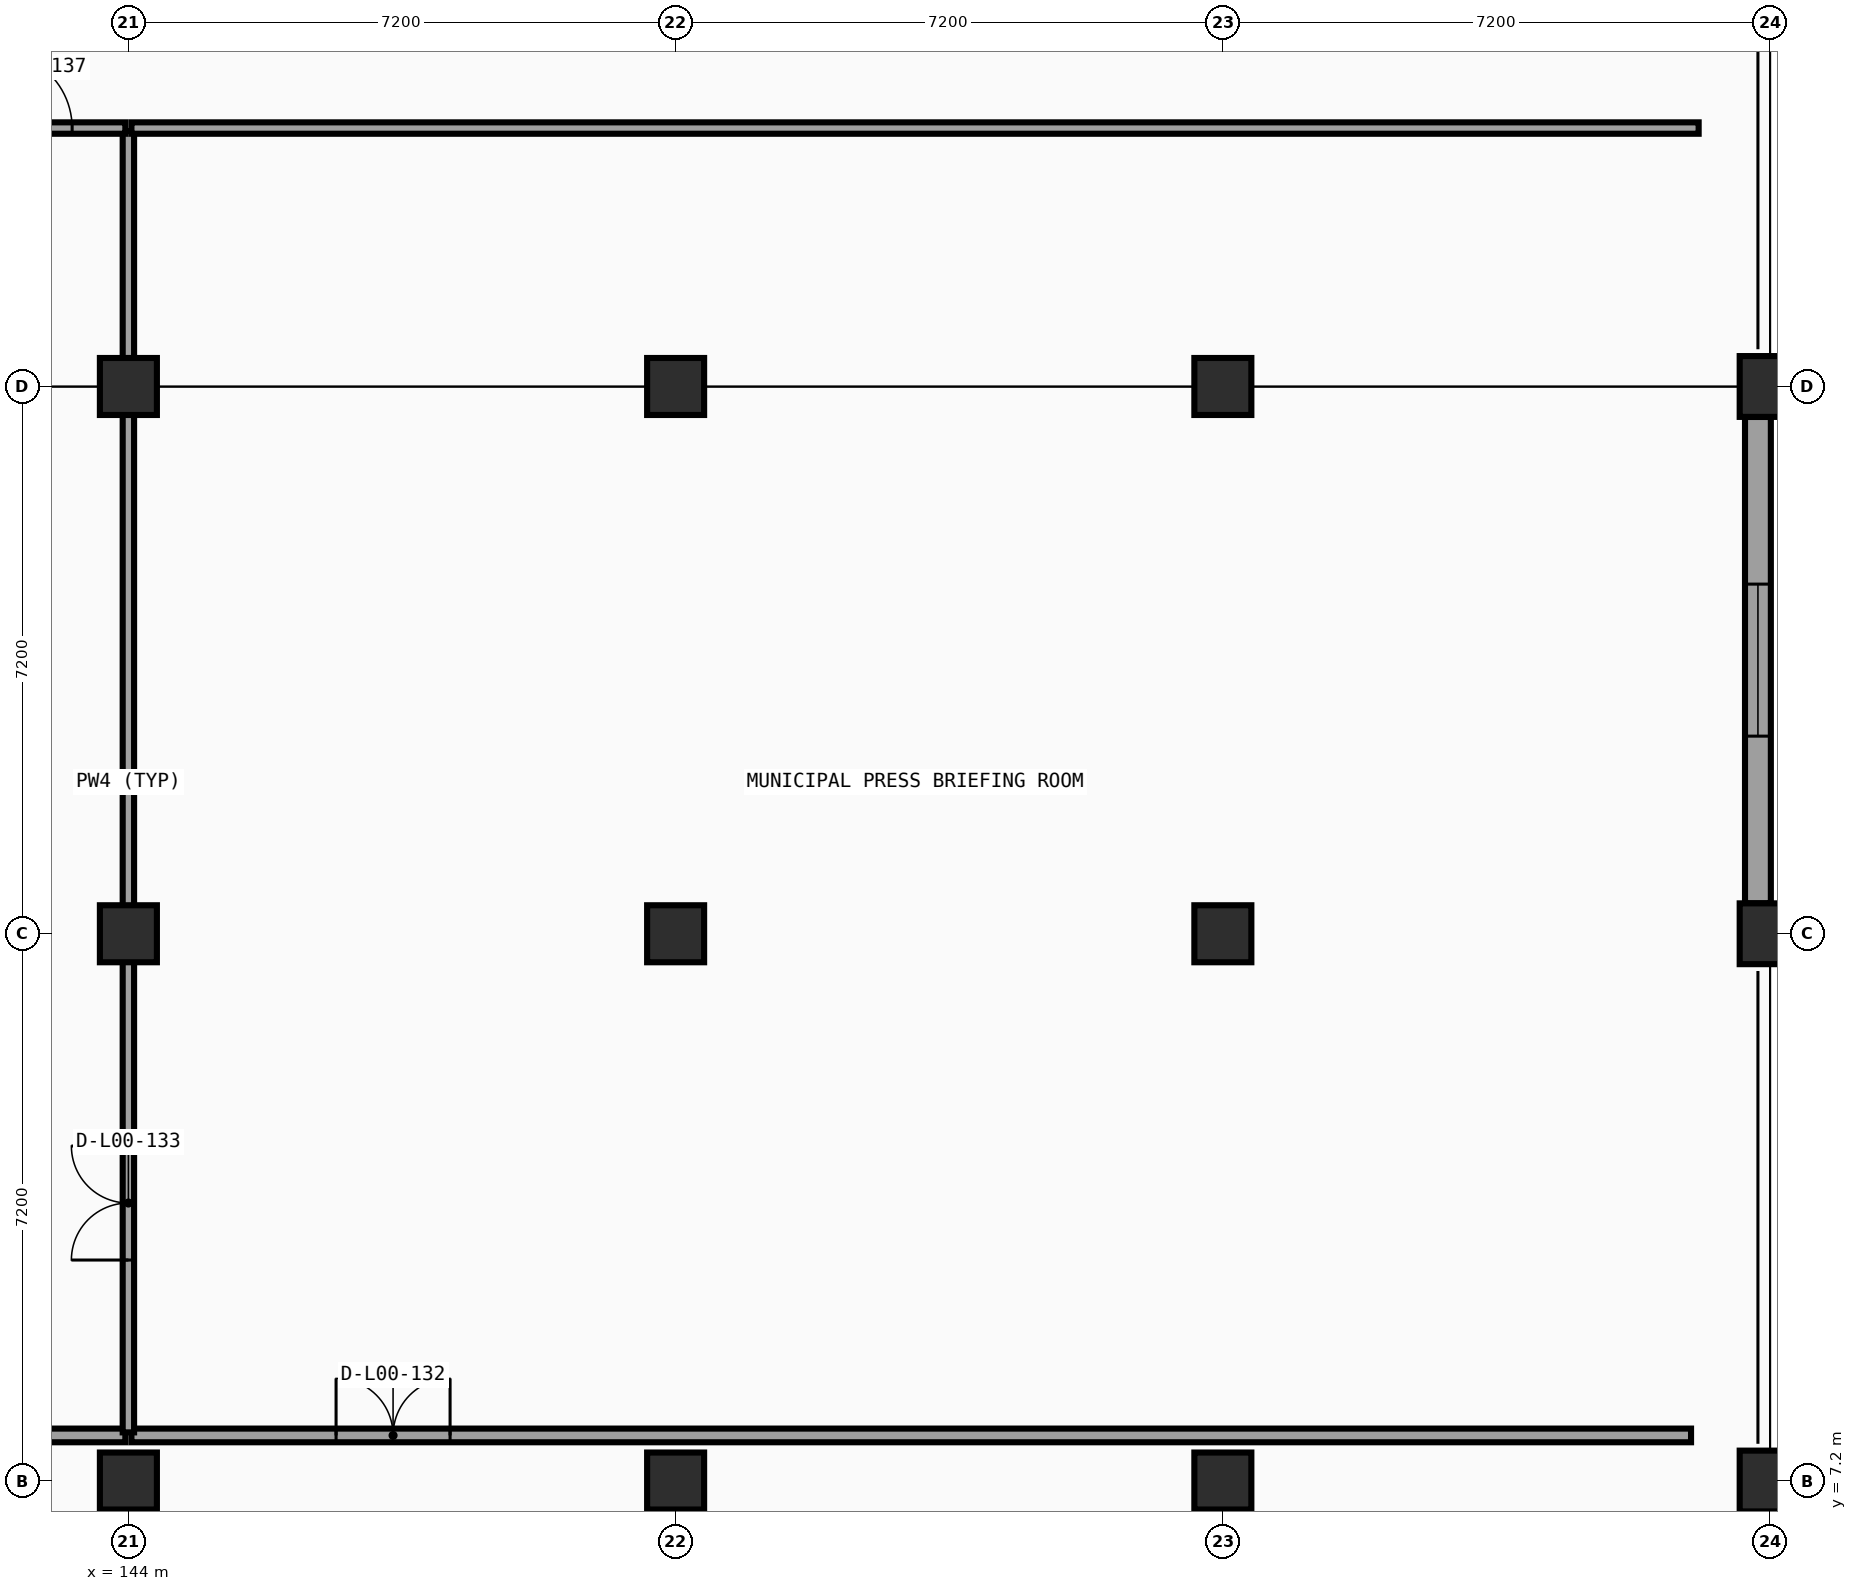
"""IFC4 building model, lengths in metres.
Left out: names, types, materials, properties, quantities, classifications, styles, units other than length and angle.
Written with IfcOpenShell. Run it as: python <this file> out.ifc"""

import sys

from ifc_helpers import new_model, si_unit, direction, frame, frame_2d, origin, origin_2d, place, context, subcontext, project, spatial, rectangle, extrude, element, fill, save


model = new_model("IFC4")
c1 = context("Model", 3, precision=1e-05, world=origin(), true_north=direction((0.0, 1.0)))
c2 = subcontext(c1, "Body", "Model", "MODEL_VIEW")
j1 = project(units=[si_unit("LENGTHUNIT", "METRE"), si_unit("PLANEANGLEUNIT", "RADIAN")], contexts=[c1])
p1 = place(None, origin())
s1 = spatial("IfcSite", under=j1, at=p1, CompositionType="ELEMENT")
p2 = place(p1, origin())
s2 = spatial("IfcBuilding", under=s1, at=p2, CompositionType="ELEMENT")
p3 = place(p2, origin())
s3 = spatial("IfcBuildingStorey", under=s2, at=p3, CompositionType="ELEMENT", Elevation=0.0)
for number, where, z_axis, x_axis in (
    (1, (144.0, 7.2, 0.0), (0.0, 0.0, 1.0), (1.0, 0.0, 0.0)),
    (2, (144.0, 14.4, 0.0), (0.0, 0.0, 1.0), (1.0, 0.0, 0.0)),
    (3, (144.0, 21.6, 0.0), (0.0, 0.0, 1.0), (1.0, 0.0, 0.0)),
    (4, (151.2, 7.2, 0.0), (0.0, 0.0, 1.0), (1.0, 0.0, 0.0)),
    (5, (151.2, 14.4, 0.0), (0.0, 0.0, 1.0), (1.0, 0.0, 0.0)),
    (6, (151.2, 21.6, 0.0), (0.0, 0.0, 1.0), (1.0, 0.0, 0.0)),
    (7, (158.4, 7.2, 0.0), (0.0, 0.0, 1.0), (1.0, 0.0, 0.0)),
    (8, (158.4, 14.4, 0.0), (0.0, 0.0, 1.0), (1.0, 0.0, 0.0)),
    (9, (158.4, 21.6, 0.0), (0.0, 0.0, 1.0), (1.0, 0.0, 0.0)),
):
    element("IfcColumn", number, at=place(p3, frame(where, z_axis=z_axis, x_axis=x_axis)), inside=s3, PredefinedType="COLUMN", context=c2, shape_type="SweptSolid", body=[
        extrude(rectangle(XDim=0.75, YDim=0.75, at=origin_2d()), origin(), (0.0, 0.0, 1.0), 5.4),
    ])
for number, where, z_axis, x_axis in (
    (10, (165.6, 7.2, 0.0), (0.0, 0.0, 1.0), (1.0, 0.0, 0.0)),
    (11, (165.6, 14.4, 0.0), (0.0, 0.0, 1.0), (1.0, 0.0, 0.0)),
    (12, (165.6, 21.6, 0.0), (0.0, 0.0, 1.0), (1.0, 0.0, 0.0)),
):
    element("IfcColumn", number, at=place(p3, frame(where, z_axis=z_axis, x_axis=x_axis)), inside=s3, PredefinedType="COLUMN", context=c2, shape_type="SweptSolid", body=[
        extrude(rectangle(XDim=0.8, YDim=0.8, at=origin_2d()), origin(), (0.0, 0.0, 1.0), 5.4),
    ])
p4 = place(p3, frame((165.44, 21.199, 0.0), z_axis=(0.0, 0.0, 1.0), x_axis=(0.0, -1.0, 0.0)))
e13 = element("IfcWall", 13, at=p4, inside=s3, PredefinedType="SOLIDWALL", context=c2, shape_type="SweptSolid", body=[
    extrude(rectangle(XDim=6.398, YDim=0.34, at=frame_2d((3.199, 0.0))), origin(), (0.0, 0.0, 1.0), 4.461),
])
p5 = place(p4, frame((2.199, 0.0, 0.85)))
e14 = element("IfcOpeningElement", 14, at=p5, cuts=e13, PredefinedType="OPENING", context=c2, shape_type="SweptSolid", body=[
    extrude(rectangle(XDim=2.0, YDim=2.15, at=frame_2d((1.0, 1.075))), frame((0.0, 0.18, 0.0), z_axis=(0.0, -1.0, 0.0), x_axis=(1.0, 0.0, 0.0)), (0.0, 0.0, 1.0), 0.36),
])
p6 = place(p3, frame((116.04, 7.8, 0.0), z_axis=(0.0, 0.0, 1.0), x_axis=(1.0, 0.0, 0.0)))
e15 = element("IfcWall", 15, at=p6, inside=s3, PredefinedType="PARTITIONING", context=c2, shape_type="SweptSolid", body=[
    extrude(rectangle(XDim=27.92, YDim=0.18, at=frame_2d((13.96, 0.0))), origin(), (0.0, 0.0, 1.0), 4.311),
])
p7 = place(p6, frame((16.22, 0.0, 0.0)))
e16 = element("IfcOpeningElement", 16, at=p7, cuts=e15, PredefinedType="OPENING", context=c2, shape_type="SweptSolid", body=[
    extrude(rectangle(XDim=1.8, YDim=2.15, at=frame_2d((0.9, 1.075))), frame((0.0, 0.1, 0.0), z_axis=(0.0, -1.0, 0.0), x_axis=(1.0, 0.0, 0.0)), (0.0, 0.0, 1.0), 0.2),
])
p8 = place(p3, frame((144.04, 7.8, 0.0), z_axis=(0.0, 0.0, 1.0), x_axis=(1.0, 0.0, 0.0)))
e17 = element("IfcWall", 17, at=p8, inside=s3, PredefinedType="PARTITIONING", context=c2, shape_type="SweptSolid", body=[
    extrude(rectangle(XDim=20.52, YDim=0.18, at=frame_2d((10.26, 0.0))), origin(), (0.0, 0.0, 1.0), 4.311),
])
p9 = place(p8, frame((2.692, 0.0, 0.0)))
e18 = element("IfcOpeningElement", 18, at=p9, cuts=e17, PredefinedType="OPENING", context=c2, shape_type="SweptSolid", body=[
    extrude(rectangle(XDim=1.5, YDim=2.1, at=frame_2d((0.75, 1.05))), frame((0.0, 0.1, 0.0), z_axis=(0.0, -1.0, 0.0), x_axis=(1.0, 0.0, 0.0)), (0.0, 0.0, 1.0), 0.2),
])
p10 = place(p3, frame((144.0, 7.84, 0.0), z_axis=(0.0, 0.0, 1.0), x_axis=(0.0, 1.0, 0.0)))
e19 = element("IfcWall", 19, at=p10, inside=s3, PredefinedType="PARTITIONING", context=c2, shape_type="SweptSolid", body=[
    extrude(rectangle(XDim=17.12, YDim=0.15, at=frame_2d((8.56, 0.0))), origin(), (0.0, 0.0, 1.0), 4.311),
])
p11 = place(p10, frame((2.268, 0.0, 0.0)))
e20 = element("IfcOpeningElement", 20, at=p11, cuts=e19, PredefinedType="OPENING", context=c2, shape_type="SweptSolid", body=[
    extrude(rectangle(XDim=1.5, YDim=2.1, at=frame_2d((0.75, 1.05))), frame((0.0, 0.085, 0.0), z_axis=(0.0, -1.0, 0.0), x_axis=(1.0, 0.0, 0.0)), (0.0, 0.0, 1.0), 0.17),
])
p12 = place(p3, frame((141.84, 25.0, 0.0), z_axis=(0.0, 0.0, 1.0), x_axis=(1.0, 0.0, 0.0)))
e21 = element("IfcWall", 21, at=p12, inside=s3, PredefinedType="PARTITIONING", context=c2, shape_type="SweptSolid", body=[
    extrude(rectangle(XDim=2.12, YDim=0.15, at=frame_2d((1.06, 0.0))), origin(), (0.0, 0.0, 1.0), 4.311),
])
p13 = place(p12, frame((0.42, 0.0, 0.0)))
e22 = element("IfcOpeningElement", 22, at=p13, cuts=e21, PredefinedType="OPENING", context=c2, shape_type="SweptSolid", body=[
    extrude(rectangle(XDim=1.0, YDim=2.1, at=frame_2d((0.5, 1.05))), frame((0.0, 0.085, 0.0), z_axis=(0.0, -1.0, 0.0), x_axis=(1.0, 0.0, 0.0)), (0.0, 0.0, 1.0), 0.17),
])
p14 = place(p3, frame((144.04, 25.0, 0.0), z_axis=(0.0, 0.0, 1.0), x_axis=(1.0, 0.0, 0.0)))
e23 = element("IfcWall", 23, at=p14, inside=s3, PredefinedType="PARTITIONING", context=c2, shape_type="SweptSolid", body=[
    extrude(rectangle(XDim=20.62, YDim=0.15, at=frame_2d((10.31, 0.0))), origin(), (0.0, 0.0, 1.0), 4.311),
])
p15 = place(p5, origin())
e24 = element("IfcWindow", 24, at=p15, inside=s3, PartitioningType="SINGLE_PANEL", PredefinedType="WINDOW", context=c2, shape_type="SweptSolid", body=[
    extrude(rectangle(XDim=2.0, YDim=2.15, at=frame_2d((1.0, 1.075))), frame((0.0, 0.03, 0.0), z_axis=(0.0, -1.0, 0.0), x_axis=(1.0, 0.0, 0.0)), (0.0, 0.0, 1.0), 0.06),
])
fill(e14, e24)
p16 = place(p9, origin())
e25 = element("IfcDoor", 25, at=p16, inside=s3, OperationType="DOUBLE_DOOR_SINGLE_SWING", PredefinedType="DOOR", context=c2, shape_type="SweptSolid", body=[
    extrude(rectangle(XDim=1.5, YDim=2.1, at=frame_2d((0.75, 1.05))), frame((0.0, 0.025, 0.0), z_axis=(0.0, -1.0, 0.0), x_axis=(1.0, 0.0, 0.0)), (0.0, 0.0, 1.0), 0.05),
])
fill(e18, e25)
p17 = place(p11, origin())
e26 = element("IfcDoor", 26, at=p17, inside=s3, OperationType="DOUBLE_DOOR_SINGLE_SWING", PredefinedType="DOOR", context=c2, shape_type="SweptSolid", body=[
    extrude(rectangle(XDim=1.5, YDim=2.1, at=frame_2d((0.75, 1.05))), frame((0.0, 0.025, 0.0), z_axis=(0.0, -1.0, 0.0), x_axis=(1.0, 0.0, 0.0)), (0.0, 0.0, 1.0), 0.05),
])
fill(e20, e26)
p18 = place(p13, origin())
e27 = element("IfcDoor", 27, at=p18, inside=s3, OperationType="SINGLE_SWING_LEFT", PredefinedType="DOOR", context=c2, shape_type="SweptSolid", body=[
    extrude(rectangle(XDim=1.0, YDim=2.1, at=frame_2d((0.5, 1.05))), frame((0.0, 0.025, 0.0), z_axis=(0.0, -1.0, 0.0), x_axis=(1.0, 0.0, 0.0)), (0.0, 0.0, 1.0), 0.05),
])
fill(e22, e27)
save(model, sys.argv[1])
